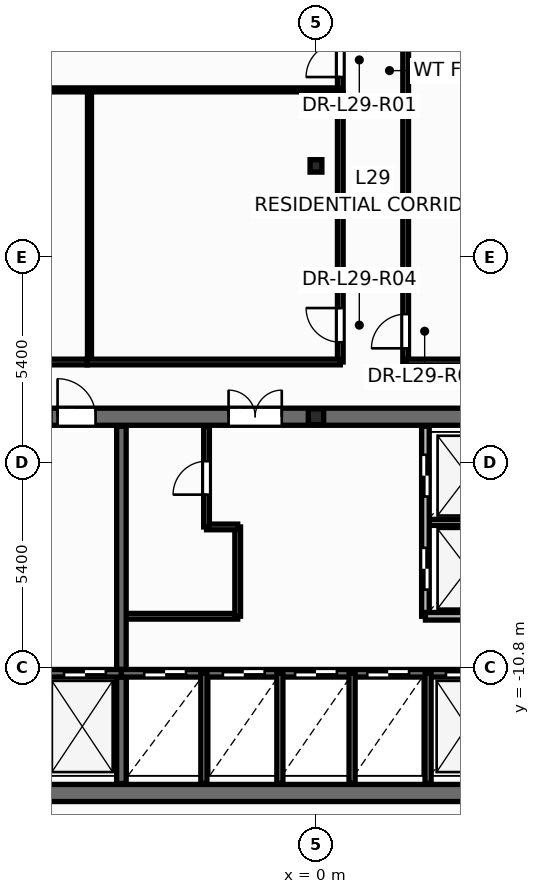
"""IFC4 building model, lengths in metres.
Left out: names, types, materials, properties, quantities, classifications, styles, units other than length and angle.
Written with IfcOpenShell. Run it as: python <this file> out.ifc"""

import sys

from ifc_helpers import new_model, si_unit, direction, frame, frame_2d, origin, origin_2d, place, context, subcontext, project, spatial, rectangle, i_section, extrude, element, fill, save


model = new_model("IFC4")
c1 = context("Model", 3, precision=1e-05, world=origin(), true_north=direction((0.0, 1.0)))
c2 = subcontext(c1, "Body", "Model", "MODEL_VIEW")
j1 = project(units=[si_unit("LENGTHUNIT", "METRE"), si_unit("PLANEANGLEUNIT", "RADIAN")], contexts=[c1])
p1 = place(None, origin())
s1 = spatial("IfcSite", under=j1, at=p1, CompositionType="ELEMENT")
p2 = place(p1, origin())
s2 = spatial("IfcBuilding", under=s1, at=p2, CompositionType="ELEMENT")
p3 = place(p2, frame((0.0, 0.0, 114.0)))
s3 = spatial("IfcBuildingStorey", under=s2, at=p3, CompositionType="ELEMENT", Elevation=114.0)
p4 = place(p3, frame((0.0, -4.2, 0.0), z_axis=(0.0, 0.0, 1.0), x_axis=(1.0, 0.0, 0.0)))
e1 = element("IfcColumn", 1, at=p4, inside=s3, PredefinedType="PILASTER", context=c2, shape_type="SweptSolid", body=[
    extrude(i_section(OverallWidth=0.405, OverallDepth=0.414, WebThickness=0.022, FlangeThickness=0.032, at=origin_2d()), origin(), (0.0, 0.0, 1.0), 3.6),
])
p5 = place(p3, frame((0.0, 2.4, 0.0), z_axis=(0.0, 0.0, 1.0), x_axis=(1.0, 0.0, 0.0)))
e2 = element("IfcColumn", 2, at=p5, inside=s3, PredefinedType="COLUMN", context=c2, shape_type="SweptSolid", body=[
    extrude(i_section(OverallWidth=0.311, OverallDepth=0.327, WebThickness=0.016, FlangeThickness=0.025, at=origin_2d()), origin(), (0.0, 0.0, 1.0), 3.6),
])
p6 = place(p3, frame((-5.12, -9.45, 0.0), z_axis=(0.0, 0.0, 1.0), x_axis=(1.0, 0.0, 0.0)))
e3 = element("IfcWall", 3, at=p6, inside=s3, PredefinedType="PARTITIONING", context=c2, shape_type="SweptSolid", body=[
    extrude(rectangle(XDim=3.06, YDim=0.15, at=frame_2d((1.53, 0.0))), origin(), (0.0, 0.0, 1.0), 3.32),
])
p7 = place(p3, frame((-2.06, -9.45, 0.0), z_axis=(0.0, 0.0, 1.0), x_axis=(0.0, 1.0, 0.0)))
e4 = element("IfcWall", 4, at=p7, inside=s3, PredefinedType="PARTITIONING", context=c2, shape_type="SweptSolid", body=[
    extrude(rectangle(XDim=2.35, YDim=0.15, at=frame_2d((1.175, 0.0))), origin(), (0.0, 0.0, 1.0), 3.32),
])
p8 = place(p3, frame((-2.88, -7.1, 0.0), z_axis=(0.0, 0.0, 1.0), x_axis=(1.0, 0.0, 0.0)))
e5 = element("IfcWall", 5, at=p8, inside=s3, PredefinedType="PARTITIONING", context=c2, shape_type="SweptSolid", body=[
    extrude(rectangle(XDim=0.82, YDim=0.15, at=frame_2d((0.41, 0.0))), origin(), (0.0, 0.0, 1.0), 3.32),
])
p9 = place(p3, frame((-2.88, -7.1, 0.0), z_axis=(0.0, 0.0, 1.0), x_axis=(0.0, 1.0, 0.0)))
e6 = element("IfcWall", 6, at=p9, inside=s3, PredefinedType="PARTITIONING", context=c2, shape_type="SweptSolid", body=[
    extrude(rectangle(XDim=2.65, YDim=0.15, at=frame_2d((1.325, 0.0))), origin(), (0.0, 0.0, 1.0), 3.32),
])
p10 = place(p9, frame((0.85, 0.0, 0.0)))
e7 = element("IfcOpeningElement", 7, at=p10, cuts=e6, PredefinedType="OPENING", context=c2, shape_type="SweptSolid", body=[
    extrude(rectangle(XDim=0.886, YDim=2.104, at=frame_2d((0.44, 1.052))), frame((0.0, 0.085, 0.0), z_axis=(0.0, -1.0, 0.0), x_axis=(1.0, 0.0, 0.0)), (0.0, 0.0, 1.0), 0.17),
])
p11 = place(p3, frame((2.88, -6.98, 0.0), z_axis=(0.0, 0.0, 1.0), x_axis=(1.0, 0.0, 0.0)))
e8 = element("IfcWall", 8, at=p11, inside=s3, PredefinedType="PARTITIONING", context=c2, shape_type="SweptSolid", body=[
    extrude(rectangle(XDim=2.24, YDim=0.16, at=frame_2d((1.12, 0.0))), origin(), (0.0, 0.0, 1.0), 3.32),
])
p12 = place(p3, frame((-12.65, -14.1, 0.0), z_axis=(0.0, 0.0, 1.0), x_axis=(1.0, 0.0, 0.0)))
e9 = element("IfcWall", 9, at=p12, inside=s3, PredefinedType="SHEAR", context=c2, shape_type="SweptSolid", body=[
    extrude(rectangle(XDim=25.3, YDim=0.45, at=frame_2d((12.65, 0.0))), origin(), (0.0, 0.0, 1.0), 3.6),
])
p13 = place(p3, frame((-12.65, -4.2, 0.0), z_axis=(0.0, 0.0, 1.0), x_axis=(1.0, 0.0, 0.0)))
e10 = element("IfcWall", 10, at=p13, inside=s3, PredefinedType="SHEAR", context=c2, shape_type="SweptSolid", body=[
    extrude(rectangle(XDim=25.3, YDim=0.45, at=frame_2d((12.65, 0.0))), origin(), (0.0, 0.0, 1.0), 3.6),
])
p14 = place(p13, frame((0.95, 0.0, 0.0)))
e11 = element("IfcOpeningElement", 11, at=p14, cuts=e10, PredefinedType="OPENING", context=c2, shape_type="SweptSolid", body=[
    extrude(rectangle(XDim=0.756, YDim=2.054, at=frame_2d((0.375, 1.027))), frame((0.0, 0.235, 0.0), z_axis=(0.0, -1.0, 0.0), x_axis=(1.0, 0.0, 0.0)), (0.0, 0.0, 1.0), 0.47),
])
p15 = place(p13, frame((2.6, 0.0, 0.0)))
e12 = element("IfcOpeningElement", 12, at=p15, cuts=e10, PredefinedType="OPENING", context=c2, shape_type="SweptSolid", body=[
    extrude(rectangle(XDim=0.756, YDim=2.054, at=frame_2d((0.375, 1.027))), frame((0.0, 0.235, 0.0), z_axis=(0.0, -1.0, 0.0), x_axis=(1.0, 0.0, 0.0)), (0.0, 0.0, 1.0), 0.47),
])
p16 = place(p13, frame((21.85, 0.0, 0.0)))
e13 = element("IfcOpeningElement", 13, at=p16, cuts=e10, PredefinedType="OPENING", context=c2, shape_type="SweptSolid", body=[
    extrude(rectangle(XDim=0.756, YDim=2.054, at=frame_2d((0.375, 1.027))), frame((0.0, 0.235, 0.0), z_axis=(0.0, -1.0, 0.0), x_axis=(1.0, 0.0, 0.0)), (0.0, 0.0, 1.0), 0.47),
])
p17 = place(p13, frame((23.5, 0.0, 0.0)))
e14 = element("IfcOpeningElement", 14, at=p17, cuts=e10, PredefinedType="OPENING", context=c2, shape_type="SweptSolid", body=[
    extrude(rectangle(XDim=0.756, YDim=2.054, at=frame_2d((0.375, 1.027))), frame((0.0, 0.235, 0.0), z_axis=(0.0, -1.0, 0.0), x_axis=(1.0, 0.0, 0.0)), (0.0, 0.0, 1.0), 0.47),
])
p18 = place(p13, frame((5.85, 0.0, 0.0)))
e15 = element("IfcOpeningElement", 15, at=p18, cuts=e10, PredefinedType="OPENING", context=c2, shape_type="SweptSolid", body=[
    extrude(rectangle(XDim=1.006, YDim=2.104, at=frame_2d((0.5, 1.052))), frame((0.0, 0.235, 0.0), z_axis=(0.0, -1.0, 0.0), x_axis=(1.0, 0.0, 0.0)), (0.0, 0.0, 1.0), 0.47),
])
p19 = place(p13, frame((10.35, 0.0, 0.0)))
e16 = element("IfcOpeningElement", 16, at=p19, cuts=e10, PredefinedType="OPENING", context=c2, shape_type="SweptSolid", body=[
    extrude(rectangle(XDim=1.406, YDim=2.154, at=frame_2d((0.7, 1.077))), frame((0.0, 0.235, 0.0), z_axis=(0.0, -1.0, 0.0), x_axis=(1.0, 0.0, 0.0)), (0.0, 0.0, 1.0), 0.47),
])
p20 = place(p13, frame((18.45, 0.0, 0.0)))
e17 = element("IfcOpeningElement", 17, at=p20, cuts=e10, PredefinedType="OPENING", context=c2, shape_type="SweptSolid", body=[
    extrude(rectangle(XDim=1.006, YDim=2.104, at=frame_2d((0.5, 1.052))), frame((0.0, 0.235, 0.0), z_axis=(0.0, -1.0, 0.0), x_axis=(1.0, 0.0, 0.0)), (0.0, 0.0, 1.0), 0.47),
])
p21 = place(p3, frame((-5.12, -13.85, 0.0), z_axis=(0.0, 0.0, 1.0), x_axis=(0.0, 1.0, 0.0)))
e18 = element("IfcWall", 18, at=p21, inside=s3, PredefinedType="SHEAR", context=c2, shape_type="SweptSolid", body=[
    extrude(rectangle(XDim=9.4, YDim=0.25, at=frame_2d((4.7, 0.0))), origin(), (0.0, 0.0, 1.0), 3.6),
])
p22 = place(p3, frame((-8.48, -10.95, 0.0), z_axis=(0.0, 0.0, 1.0), x_axis=(1.0, 0.0, 0.0)))
e19 = element("IfcWall", 19, at=p22, inside=s3, PredefinedType="SOLIDWALL", context=c2, shape_type="SweptSolid", body=[
    extrude(rectangle(XDim=3.36, YDim=0.2, at=frame_2d((1.68, 0.0))), origin(), (0.0, 0.0, 1.0), 3.6),
])
p23 = place(p22, frame((0.28, 0.0, 0.0)))
e20 = element("IfcOpeningElement", 20, at=p23, cuts=e19, PredefinedType="OPENING", context=c2, shape_type="SweptSolid", body=[
    extrude(rectangle(XDim=0.756, YDim=2.054, at=frame_2d((0.375, 1.027))), frame((0.0, 0.11, 0.0), z_axis=(0.0, -1.0, 0.0), x_axis=(1.0, 0.0, 0.0)), (0.0, 0.0, 1.0), 0.22),
])
p24 = place(p22, frame((1.85, 0.0, 0.0)))
e21 = element("IfcOpeningElement", 21, at=p24, cuts=e19, PredefinedType="OPENING", context=c2, shape_type="SweptSolid", body=[
    extrude(rectangle(XDim=1.106, YDim=2.104, at=frame_2d((0.55, 1.052))), frame((0.0, 0.11, 0.0), z_axis=(0.0, -1.0, 0.0), x_axis=(1.0, 0.0, 0.0)), (0.0, 0.0, 1.0), 0.22),
])
p25 = place(p3, frame((-5.12, -10.95, 0.0), z_axis=(0.0, 0.0, 1.0), x_axis=(1.0, 0.0, 0.0)))
e22 = element("IfcWall", 22, at=p25, inside=s3, PredefinedType="SOLIDWALL", context=c2, shape_type="SweptSolid", body=[
    extrude(rectangle(XDim=10.24, YDim=0.2, at=frame_2d((5.12, 0.0))), origin(), (0.0, 0.0, 1.0), 3.6),
])
p26 = place(p25, frame((0.6, 0.0, 0.0)))
e23 = element("IfcOpeningElement", 23, at=p26, cuts=e22, PredefinedType="OPENING", context=c2, shape_type="SweptSolid", body=[
    extrude(rectangle(XDim=1.106, YDim=2.104, at=frame_2d((0.55, 1.052))), frame((0.0, 0.11, 0.0), z_axis=(0.0, -1.0, 0.0), x_axis=(1.0, 0.0, 0.0)), (0.0, 0.0, 1.0), 0.22),
])
p27 = place(p25, frame((2.67, 0.0, 0.0)))
e24 = element("IfcOpeningElement", 24, at=p27, cuts=e22, PredefinedType="OPENING", context=c2, shape_type="SweptSolid", body=[
    extrude(rectangle(XDim=1.106, YDim=2.104, at=frame_2d((0.55, 1.052))), frame((0.0, 0.11, 0.0), z_axis=(0.0, -1.0, 0.0), x_axis=(1.0, 0.0, 0.0)), (0.0, 0.0, 1.0), 0.22),
])
p28 = place(p25, frame((4.57, 0.0, 0.0)))
e25 = element("IfcOpeningElement", 25, at=p28, cuts=e22, PredefinedType="OPENING", context=c2, shape_type="SweptSolid", body=[
    extrude(rectangle(XDim=1.106, YDim=2.104, at=frame_2d((0.55, 1.052))), frame((0.0, 0.11, 0.0), z_axis=(0.0, -1.0, 0.0), x_axis=(1.0, 0.0, 0.0)), (0.0, 0.0, 1.0), 0.22),
])
p29 = place(p25, frame((6.47, 0.0, 0.0)))
e26 = element("IfcOpeningElement", 26, at=p29, cuts=e22, PredefinedType="OPENING", context=c2, shape_type="SweptSolid", body=[
    extrude(rectangle(XDim=1.106, YDim=2.104, at=frame_2d((0.55, 1.052))), frame((0.0, 0.11, 0.0), z_axis=(0.0, -1.0, 0.0), x_axis=(1.0, 0.0, 0.0)), (0.0, 0.0, 1.0), 0.22),
])
p30 = place(p25, frame((8.54, 0.0, 0.0)))
e27 = element("IfcOpeningElement", 27, at=p30, cuts=e22, PredefinedType="OPENING", context=c2, shape_type="SweptSolid", body=[
    extrude(rectangle(XDim=1.106, YDim=2.104, at=frame_2d((0.55, 1.052))), frame((0.0, 0.11, 0.0), z_axis=(0.0, -1.0, 0.0), x_axis=(1.0, 0.0, 0.0)), (0.0, 0.0, 1.0), 0.22),
])
for number, where, z_axis, x_axis in (
    (28, (-2.95, -13.85, 0.0), (0.0, 0.0, 1.0), (0.0, 1.0, 0.0)),
    (29, (2.95, -13.85, 0.0), (0.0, 0.0, 1.0), (0.0, 1.0, 0.0)),
):
    element("IfcWall", number, at=place(p3, frame(where, z_axis=z_axis, x_axis=x_axis)), inside=s3, PredefinedType="PARTITIONING", context=c2, shape_type="SweptSolid", body=[
        extrude(rectangle(XDim=2.9, YDim=0.16, at=frame_2d((1.45, 0.0))), origin(), (0.0, 0.0, 1.0), 2.345),
    ])
p31 = place(p3, frame((2.88, -9.45, 0.0), z_axis=(0.0, 0.0, 1.0), x_axis=(0.0, 1.0, 0.0)))
e30 = element("IfcWall", 30, at=p31, inside=s3, PredefinedType="SOLIDWALL", context=c2, shape_type="SweptSolid", body=[
    extrude(rectangle(XDim=5.0, YDim=0.2, at=frame_2d((2.5, 0.0))), origin(), (0.0, 0.0, 1.0), 3.32),
])
p32 = place(p31, frame((0.7, 0.0, 0.0)))
e31 = element("IfcOpeningElement", 31, at=p32, cuts=e30, PredefinedType="OPENING", context=c2, shape_type="SweptSolid", body=[
    extrude(rectangle(XDim=1.106, YDim=2.104, at=frame_2d((0.55, 1.052))), frame((0.0, 0.11, 0.0), z_axis=(0.0, -1.0, 0.0), x_axis=(1.0, 0.0, 0.0)), (0.0, 0.0, 1.0), 0.22),
])
p33 = place(p31, frame((3.15, 0.0, 0.0)))
e32 = element("IfcOpeningElement", 32, at=p33, cuts=e30, PredefinedType="OPENING", context=c2, shape_type="SweptSolid", body=[
    extrude(rectangle(XDim=1.106, YDim=2.104, at=frame_2d((0.55, 1.052))), frame((0.0, 0.11, 0.0), z_axis=(0.0, -1.0, 0.0), x_axis=(1.0, 0.0, 0.0)), (0.0, 0.0, 1.0), 0.22),
])
p34 = place(p3, frame((2.88, -9.45, 0.0), z_axis=(0.0, 0.0, 1.0), x_axis=(1.0, 0.0, 0.0)))
e33 = element("IfcWall", 33, at=p34, inside=s3, PredefinedType="SOLIDWALL", context=c2, shape_type="SweptSolid", body=[
    extrude(rectangle(XDim=2.24, YDim=0.2, at=frame_2d((1.12, 0.0))), origin(), (0.0, 0.0, 1.0), 3.32),
])
for number, where, z_axis, x_axis in (
    (34, (-0.95, -13.85, 0.0), (0.0, 0.0, 1.0), (0.0, 1.0, 0.0)),
    (35, (0.95, -13.85, 0.0), (0.0, 0.0, 1.0), (0.0, 1.0, 0.0)),
):
    element("IfcWall", number, at=place(p3, frame(where, z_axis=z_axis, x_axis=x_axis)), inside=s3, PredefinedType="PARTITIONING", context=c2, shape_type="SweptSolid", body=[
        extrude(rectangle(XDim=2.9, YDim=0.16, at=frame_2d((1.45, 0.0))), origin(), (0.0, 0.0, 1.0), 2.345),
    ])
p35 = place(p3, frame((2.36, -2.76, 0.0), z_axis=(0.0, 0.0, 1.0), x_axis=(0.0, 1.0, 0.0)))
e36 = element("IfcWall", 36, at=p35, inside=s3, PredefinedType="PARTITIONING", context=c2, shape_type="SweptSolid", body=[
    extrude(rectangle(XDim=9.02, YDim=0.15, at=frame_2d((4.51, 0.0))), origin(), (0.0, 0.0, 1.0), 2.295),
])
p36 = place(p35, frame((0.36, 0.0, 0.0)))
e37 = element("IfcOpeningElement", 37, at=p36, cuts=e36, PredefinedType="OPENING", context=c2, shape_type="SweptSolid", body=[
    extrude(rectangle(XDim=0.906, YDim=2.104, at=frame_2d((0.45, 1.052))), frame((0.0, 0.085, 0.0), z_axis=(0.0, -1.0, 0.0), x_axis=(1.0, 0.0, 0.0)), (0.0, 0.0, 1.0), 0.17),
])
p37 = place(p3, frame((0.64, 4.34, 0.0), z_axis=(0.0, 0.0, 1.0), x_axis=(0.0, 1.0, 0.0)))
e38 = element("IfcWall", 38, at=p37, inside=s3, PredefinedType="PARTITIONING", context=c2, shape_type="SweptSolid", body=[
    extrude(rectangle(XDim=8.702, YDim=0.15, at=frame_2d((4.351, 0.0))), origin(), (0.0, 0.0, 1.0), 2.587),
])
p38 = place(p37, frame((0.398, 0.0, 0.0)))
e39 = element("IfcOpeningElement", 39, at=p38, cuts=e38, PredefinedType="OPENING", context=c2, shape_type="SweptSolid", body=[
    extrude(rectangle(XDim=0.906, YDim=2.104, at=frame_2d((0.45, 1.052))), frame((0.0, 0.085, 0.0), z_axis=(0.0, -1.0, 0.0), x_axis=(1.0, 0.0, 0.0)), (0.0, 0.0, 1.0), 0.17),
])
p39 = place(p3, frame((0.64, -2.76, 0.0), z_axis=(0.0, 0.0, 1.0), x_axis=(0.0, 1.0, 0.0)))
e40 = element("IfcWall", 40, at=p39, inside=s3, PredefinedType="PARTITIONING", context=c2, shape_type="SweptSolid", body=[
    extrude(rectangle(XDim=7.098, YDim=0.15, at=frame_2d((3.549, 0.0))), origin(), (0.0, 0.0, 1.0), 2.295),
])
p40 = place(p39, frame((0.52, 0.0, 0.0)))
e41 = element("IfcOpeningElement", 41, at=p40, cuts=e40, PredefinedType="OPENING", context=c2, shape_type="SweptSolid", body=[
    extrude(rectangle(XDim=0.906, YDim=2.104, at=frame_2d((0.45, 1.052))), frame((0.0, 0.085, 0.0), z_axis=(0.0, -1.0, 0.0), x_axis=(1.0, 0.0, 0.0)), (0.0, 0.0, 1.0), 0.17),
])
p41 = place(p3, frame((-5.96, -2.76, 0.0), z_axis=(0.0, 0.0, 1.0), x_axis=(0.0, 1.0, 0.0)))
e42 = element("IfcWall", 42, at=p41, inside=s3, PredefinedType="PARTITIONING", context=c2, shape_type="SweptSolid", body=[
    extrude(rectangle(XDim=7.16, YDim=0.105, at=frame_2d((3.58, 0.0))), origin(), (0.0, 0.0, 1.0), 2.295),
])
p42 = place(p3, frame((-6.02, -2.76, 0.0), z_axis=(0.0, 0.0, 1.0), x_axis=(1.0, 0.0, 0.0)))
e43 = element("IfcWall", 43, at=p42, inside=s3, PredefinedType="PARTITIONING", context=c2, shape_type="SweptSolid", body=[
    extrude(rectangle(XDim=6.66, YDim=0.15, at=frame_2d((3.33, 0.0))), origin(), (0.0, 0.0, 1.0), 2.295),
])
p43 = place(p3, frame((-12.116, 4.4, 0.0), z_axis=(0.0, 0.0, 1.0), x_axis=(1.0, 0.0, 0.0)))
e44 = element("IfcWall", 44, at=p43, inside=s3, PredefinedType="PARTITIONING", context=c2, shape_type="SweptSolid", body=[
    extrude(rectangle(XDim=12.756, YDim=0.105, at=frame_2d((6.378, 0.0))), origin(), (0.0, 0.0, 1.0), 2.295),
])
p44 = place(p3, frame((-12.5, -2.76, 0.0), z_axis=(0.0, 0.0, 1.0), x_axis=(1.0, 0.0, 0.0)))
e45 = element("IfcWall", 45, at=p44, inside=s3, PredefinedType="PARTITIONING", context=c2, shape_type="SweptSolid", body=[
    extrude(rectangle(XDim=6.478, YDim=0.15, at=frame_2d((3.239, 0.0))), origin(), (0.0, 0.0, 1.0), 2.295),
])
p45 = place(p44, frame((1.714, 0.0, 0.0)))
e46 = element("IfcOpeningElement", 46, at=p45, cuts=e45, PredefinedType="OPENING", context=c2, shape_type="SweptSolid", body=[
    extrude(rectangle(XDim=0.906, YDim=2.104, at=frame_2d((0.45, 1.052))), frame((0.0, 0.085, 0.0), z_axis=(0.0, -1.0, 0.0), x_axis=(1.0, 0.0, 0.0)), (0.0, 0.0, 1.0), 0.17),
])
p46 = place(p3, frame((2.36, -2.76, 0.0), z_axis=(0.0, 0.0, 1.0), x_axis=(1.0, 0.0, 0.0)))
e47 = element("IfcWall", 47, at=p46, inside=s3, PredefinedType="PARTITIONING", context=c2, shape_type="SweptSolid", body=[
    extrude(rectangle(XDim=5.16, YDim=0.15, at=frame_2d((2.58, 0.0))), origin(), (0.0, 0.0, 1.0), 2.295),
])
p47 = place(p10, origin())
e48 = element("IfcDoor", 48, at=p47, inside=s3, OperationType="SINGLE_SWING_LEFT", PredefinedType="DOOR", context=c2, shape_type="SweptSolid", body=[
    extrude(rectangle(XDim=0.88, YDim=2.1, at=frame_2d((0.44, 1.05))), frame((0.0, 0.025, 0.0), z_axis=(0.0, -1.0, 0.0), x_axis=(1.0, 0.0, 0.0)), (0.0, 0.0, 1.0), 0.05),
])
fill(e7, e48)
p48 = place(p32, origin())
e49 = element("IfcDoor", 49, at=p48, inside=s3, OperationType="DOUBLE_DOOR_SLIDING", PredefinedType="DOOR", context=c2, shape_type="SweptSolid", body=[
    extrude(rectangle(XDim=1.1, YDim=2.1, at=frame_2d((0.55, 1.05))), frame((0.0, 0.025, 0.0), z_axis=(0.0, -1.0, 0.0), x_axis=(1.0, 0.0, 0.0)), (0.0, 0.0, 1.0), 0.05),
])
fill(e31, e49)
p49 = place(p33, origin())
e50 = element("IfcDoor", 50, at=p49, inside=s3, OperationType="DOUBLE_DOOR_SLIDING", PredefinedType="DOOR", context=c2, shape_type="SweptSolid", body=[
    extrude(rectangle(XDim=1.1, YDim=2.1, at=frame_2d((0.55, 1.05))), frame((0.0, 0.025, 0.0), z_axis=(0.0, -1.0, 0.0), x_axis=(1.0, 0.0, 0.0)), (0.0, 0.0, 1.0), 0.05),
])
fill(e32, e50)
p50 = place(p24, origin())
e51 = element("IfcDoor", 51, at=p50, inside=s3, OperationType="DOUBLE_DOOR_SLIDING", PredefinedType="DOOR", context=c2, shape_type="SweptSolid", body=[
    extrude(rectangle(XDim=1.1, YDim=2.1, at=frame_2d((0.55, 1.05))), frame((0.0, 0.025, 0.0), z_axis=(0.0, -1.0, 0.0), x_axis=(1.0, 0.0, 0.0)), (0.0, 0.0, 1.0), 0.05),
])
fill(e21, e51)
p51 = place(p26, origin())
e52 = element("IfcDoor", 52, at=p51, inside=s3, OperationType="DOUBLE_DOOR_SLIDING", PredefinedType="DOOR", context=c2, shape_type="SweptSolid", body=[
    extrude(rectangle(XDim=1.1, YDim=2.1, at=frame_2d((0.55, 1.05))), frame((0.0, 0.025, 0.0), z_axis=(0.0, -1.0, 0.0), x_axis=(1.0, 0.0, 0.0)), (0.0, 0.0, 1.0), 0.05),
])
fill(e23, e52)
p52 = place(p27, origin())
e53 = element("IfcDoor", 53, at=p52, inside=s3, OperationType="DOUBLE_DOOR_SLIDING", PredefinedType="DOOR", context=c2, shape_type="SweptSolid", body=[
    extrude(rectangle(XDim=1.1, YDim=2.1, at=frame_2d((0.55, 1.05))), frame((0.0, 0.025, 0.0), z_axis=(0.0, -1.0, 0.0), x_axis=(1.0, 0.0, 0.0)), (0.0, 0.0, 1.0), 0.05),
])
fill(e24, e53)
p53 = place(p28, origin())
e54 = element("IfcDoor", 54, at=p53, inside=s3, OperationType="DOUBLE_DOOR_SLIDING", PredefinedType="DOOR", context=c2, shape_type="SweptSolid", body=[
    extrude(rectangle(XDim=1.1, YDim=2.1, at=frame_2d((0.55, 1.05))), frame((0.0, 0.025, 0.0), z_axis=(0.0, -1.0, 0.0), x_axis=(1.0, 0.0, 0.0)), (0.0, 0.0, 1.0), 0.05),
])
fill(e25, e54)
p54 = place(p29, origin())
e55 = element("IfcDoor", 55, at=p54, inside=s3, OperationType="DOUBLE_DOOR_SLIDING", PredefinedType="DOOR", context=c2, shape_type="SweptSolid", body=[
    extrude(rectangle(XDim=1.1, YDim=2.1, at=frame_2d((0.55, 1.05))), frame((0.0, 0.025, 0.0), z_axis=(0.0, -1.0, 0.0), x_axis=(1.0, 0.0, 0.0)), (0.0, 0.0, 1.0), 0.05),
])
fill(e26, e55)
p55 = place(p30, origin())
e56 = element("IfcDoor", 56, at=p55, inside=s3, OperationType="DOUBLE_DOOR_SLIDING", PredefinedType="DOOR", context=c2, shape_type="SweptSolid", body=[
    extrude(rectangle(XDim=1.1, YDim=2.1, at=frame_2d((0.55, 1.05))), frame((0.0, 0.025, 0.0), z_axis=(0.0, -1.0, 0.0), x_axis=(1.0, 0.0, 0.0)), (0.0, 0.0, 1.0), 0.05),
])
fill(e27, e56)
p56 = place(p18, origin())
e57 = element("IfcDoor", 57, at=p56, inside=s3, OperationType="SINGLE_SWING_LEFT", PredefinedType="DOOR", context=c2, shape_type="SweptSolid", body=[
    extrude(rectangle(XDim=1.0, YDim=2.1, at=frame_2d((0.5, 1.05))), frame((0.0, 0.025, 0.0), z_axis=(0.0, -1.0, 0.0), x_axis=(1.0, 0.0, 0.0)), (0.0, 0.0, 1.0), 0.05),
])
fill(e15, e57)
p57 = place(p19, origin())
e58 = element("IfcDoor", 58, at=p57, inside=s3, OperationType="DOUBLE_DOOR_SINGLE_SWING", PredefinedType="DOOR", context=c2, shape_type="SweptSolid", body=[
    extrude(rectangle(XDim=1.4, YDim=2.15, at=frame_2d((0.7, 1.075))), frame((0.0, 0.025, 0.0), z_axis=(0.0, -1.0, 0.0), x_axis=(1.0, 0.0, 0.0)), (0.0, 0.0, 1.0), 0.05),
])
fill(e16, e58)
p58 = place(p38, origin())
e59 = element("IfcDoor", 59, at=p58, inside=s3, OperationType="SINGLE_SWING_LEFT", PredefinedType="DOOR", context=c2, shape_type="SweptSolid", body=[
    extrude(rectangle(XDim=0.9, YDim=2.1, at=frame_2d((0.45, 1.05))), frame((0.0, 0.025, 0.0), z_axis=(0.0, -1.0, 0.0), x_axis=(1.0, 0.0, 0.0)), (0.0, 0.0, 1.0), 0.05),
])
fill(e39, e59)
p59 = place(p40, origin())
e60 = element("IfcDoor", 60, at=p59, inside=s3, OperationType="SINGLE_SWING_RIGHT", PredefinedType="DOOR", context=c2, shape_type="SweptSolid", body=[
    extrude(rectangle(XDim=0.9, YDim=2.1, at=frame_2d((0.45, 1.05))), frame((0.0, 0.025, 0.0), z_axis=(0.0, -1.0, 0.0), x_axis=(1.0, 0.0, 0.0)), (0.0, 0.0, 1.0), 0.05),
])
fill(e41, e60)
p60 = place(p36, origin())
e61 = element("IfcDoor", 61, at=p60, inside=s3, OperationType="SINGLE_SWING_LEFT", PredefinedType="DOOR", context=c2, shape_type="SweptSolid", body=[
    extrude(rectangle(XDim=0.9, YDim=2.1, at=frame_2d((0.45, 1.05))), frame((0.0, 0.025, 0.0), z_axis=(0.0, -1.0, 0.0), x_axis=(1.0, 0.0, 0.0)), (0.0, 0.0, 1.0), 0.05),
])
fill(e37, e61)
save(model, sys.argv[1])
